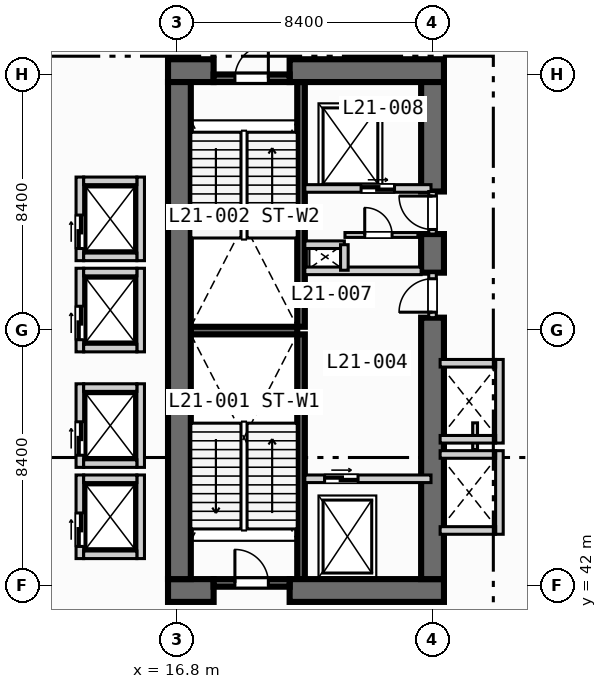
"""IFC4 building model, lengths in metres.
Left out: names, types, materials, properties, quantities, classifications, styles, units other than length and angle.
Written with IfcOpenShell. Run it as: python <this file> out.ifc"""

import sys

from ifc_helpers import new_model, si_unit, direction, frame, frame_2d, origin, place, context, subcontext, project, spatial, rectangle, extrude, element, fill, save


model = new_model("IFC4")
c1 = context("Model", 3, precision=1e-05, world=origin(), true_north=direction((0.0, 1.0)))
c2 = subcontext(c1, "Body", "Model", "MODEL_VIEW")
j1 = project(units=[si_unit("LENGTHUNIT", "METRE"), si_unit("PLANEANGLEUNIT", "RADIAN")], contexts=[c1])
p1 = place(None, origin())
s1 = spatial("IfcSite", under=j1, at=p1, CompositionType="ELEMENT")
p2 = place(p1, origin())
s2 = spatial("IfcBuilding", under=s1, at=p2, CompositionType="ELEMENT")
p3 = place(p2, frame((0.0, 0.0, 89.6)))
s3 = spatial("IfcBuildingStorey", under=s2, at=p3, CompositionType="ELEMENT", Elevation=89.6)
for number, where, z_axis, x_axis in (
    (1, (20.875, 42.2, 0.0), (0.0, 0.0, 1.0), (0.0, 1.0, 0.0)),
    (2, (20.875, 50.5, 0.0), (0.0, 0.0, 1.0), (0.0, 1.0, 0.0)),
):
    element("IfcWall", number, at=place(p3, frame(where, z_axis=z_axis, x_axis=x_axis)), inside=s3, PredefinedType="SOLIDWALL", context=c2, shape_type="SweptSolid", body=[
        extrude(rectangle(XDim=8.05, YDim=0.25, at=frame_2d((4.025, 0.0))), origin(), (0.0, 0.0, 1.0), 4.05),
    ])
p4 = place(p3, frame((17.25, 50.375, 0.0), z_axis=(0.0, 0.0, 1.0), x_axis=(1.0, 0.0, 0.0)))
e3 = element("IfcWall", 3, at=p4, inside=s3, PredefinedType="SOLIDWALL", context=c2, shape_type="SweptSolid", body=[
    extrude(rectangle(XDim=3.5, YDim=0.25, at=frame_2d((1.75, 0.0))), origin(), (0.0, 0.0, 1.0), 4.05),
])
p5 = place(p3, frame((16.5, 41.825, 0.0), z_axis=(0.0, 0.0, 1.0), x_axis=(1.0, 0.0, 0.0)))
e4 = element("IfcWall", 4, at=p5, inside=s3, PredefinedType="SHEAR", context=c2, shape_type="SweptSolid", body=[
    extrude(rectangle(XDim=1.5, YDim=0.75, at=frame_2d((0.75, 0.0))), origin(), (0.0, 0.0, 1.0), 4.05),
])
p6 = place(p3, frame((20.5, 41.825, 0.0), z_axis=(0.0, 0.0, 1.0), x_axis=(1.0, 0.0, 0.0)))
e5 = element("IfcWall", 5, at=p6, inside=s3, PredefinedType="SHEAR", context=c2, shape_type="SweptSolid", body=[
    extrude(rectangle(XDim=5.075, YDim=0.75, at=frame_2d((2.538, 0.0))), origin(), (0.0, 0.0, 1.0), 4.05),
])
p7 = place(p3, frame((16.5, 58.925, 0.0), z_axis=(0.0, 0.0, 1.0), x_axis=(1.0, 0.0, 0.0)))
e6 = element("IfcWall", 6, at=p7, inside=s3, PredefinedType="SHEAR", context=c2, shape_type="SweptSolid", body=[
    extrude(rectangle(XDim=1.5, YDim=0.75, at=frame_2d((0.75, 0.0))), origin(), (0.0, 0.0, 1.0), 4.05),
])
p8 = place(p3, frame((20.5, 58.925, 0.0), z_axis=(0.0, 0.0, 1.0), x_axis=(1.0, 0.0, 0.0)))
e7 = element("IfcWall", 7, at=p8, inside=s3, PredefinedType="SHEAR", context=c2, shape_type="SweptSolid", body=[
    extrude(rectangle(XDim=5.075, YDim=0.75, at=frame_2d((2.538, 0.0))), origin(), (0.0, 0.0, 1.0), 4.05),
])
p9 = place(p3, frame((16.875, 42.2, 0.0), z_axis=(0.0, 0.0, 1.0), x_axis=(0.0, 1.0, 0.0)))
e8 = element("IfcWall", 8, at=p9, inside=s3, PredefinedType="SHEAR", context=c2, shape_type="SweptSolid", body=[
    extrude(rectangle(XDim=16.35, YDim=0.75, at=frame_2d((8.175, 0.0))), origin(), (0.0, 0.0, 1.0), 4.05),
])
p10 = place(p3, frame((25.2, 42.2, 0.0), z_axis=(0.0, 0.0, 1.0), x_axis=(0.0, 1.0, 0.0)))
e9 = element("IfcWall", 9, at=p10, inside=s3, PredefinedType="SHEAR", context=c2, shape_type="SweptSolid", body=[
    extrude(rectangle(XDim=8.6, YDim=0.75, at=frame_2d((4.3, 0.0))), origin(), (0.0, 0.0, 1.0), 4.05),
])
p11 = place(p3, frame((25.2, 52.28, 0.0), z_axis=(0.0, 0.0, 1.0), x_axis=(0.0, 1.0, 0.0)))
e10 = element("IfcWall", 10, at=p11, inside=s3, PredefinedType="SHEAR", context=c2, shape_type="SweptSolid", body=[
    extrude(rectangle(XDim=1.27, YDim=0.75, at=frame_2d((0.635, 0.0))), origin(), (0.0, 0.0, 1.0), 4.05),
])
p12 = place(p3, frame((25.2, 54.95, 0.0), z_axis=(0.0, 0.0, 1.0), x_axis=(0.0, 1.0, 0.0)))
e11 = element("IfcWall", 11, at=p12, inside=s3, PredefinedType="SHEAR", context=c2, shape_type="SweptSolid", body=[
    extrude(rectangle(XDim=3.6, YDim=0.75, at=frame_2d((1.8, 0.0))), origin(), (0.0, 0.0, 1.0), 4.05),
])
p13 = place(p3, frame((18.0, 42.075, 0.0), z_axis=(0.0, 0.0, 1.0), x_axis=(1.0, 0.0, 0.0)))
e12 = element("IfcWall", 12, at=p13, inside=s3, PredefinedType="SOLIDWALL", context=c2, shape_type="SweptSolid", body=[
    extrude(rectangle(XDim=2.5, YDim=0.25, at=frame_2d((1.25, 0.0))), origin(), (0.0, 0.0, 1.0), 4.05),
])
p14 = place(p13, frame((0.7, 0.0, 0.0)))
e13 = element("IfcOpeningElement", 13, at=p14, cuts=e12, PredefinedType="OPENING", context=c2, shape_type="SweptSolid", body=[
    extrude(rectangle(XDim=1.1, YDim=2.15, at=frame_2d((0.55, 1.075))), frame((0.0, 0.135, 0.0), z_axis=(0.0, -1.0, 0.0), x_axis=(1.0, 0.0, 0.0)), (0.0, 0.0, 1.0), 0.27),
])
p15 = place(p3, frame((18.0, 58.675, 0.0), z_axis=(0.0, 0.0, 1.0), x_axis=(1.0, 0.0, 0.0)))
e14 = element("IfcWall", 14, at=p15, inside=s3, PredefinedType="SOLIDWALL", context=c2, shape_type="SweptSolid", body=[
    extrude(rectangle(XDim=2.5, YDim=0.25, at=frame_2d((1.25, 0.0))), origin(), (0.0, 0.0, 1.0), 4.05),
])
p16 = place(p15, frame((0.7, 0.0, 0.0)))
e15 = element("IfcOpeningElement", 15, at=p16, cuts=e14, PredefinedType="OPENING", context=c2, shape_type="SweptSolid", body=[
    extrude(rectangle(XDim=1.1, YDim=2.15, at=frame_2d((0.55, 1.075))), frame((0.0, 0.135, 0.0), z_axis=(0.0, -1.0, 0.0), x_axis=(1.0, 0.0, 0.0)), (0.0, 0.0, 1.0), 0.27),
])
p17 = place(p3, frame((21.0, 45.5, 0.0), z_axis=(0.0, 0.0, 1.0), x_axis=(1.0, 0.0, 0.0)))
e16 = element("IfcWall", 16, at=p17, inside=s3, PredefinedType="SOLIDWALL", context=c2, shape_type="SweptSolid", body=[
    extrude(rectangle(XDim=4.15, YDim=0.25, at=frame_2d((2.075, 0.0))), origin(), (0.0, 0.0, 1.0), 4.05),
])
p18 = place(p17, frame((0.65, 0.0, 0.0)))
e17 = element("IfcOpeningElement", 17, at=p18, cuts=e16, PredefinedType="OPENING", context=c2, shape_type="SweptSolid", body=[
    extrude(rectangle(XDim=1.1, YDim=2.15, at=frame_2d((0.55, 1.075))), frame((0.0, 0.135, 0.0), z_axis=(0.0, -1.0, 0.0), x_axis=(1.0, 0.0, 0.0)), (0.0, 0.0, 1.0), 0.27),
])
p19 = place(p3, frame((25.2, 50.8, 0.0), z_axis=(0.0, 0.0, 1.0), x_axis=(0.0, 1.0, 0.0)))
e18 = element("IfcWall", 18, at=p19, inside=s3, PredefinedType="SOLIDWALL", context=c2, shape_type="SweptSolid", body=[
    extrude(rectangle(XDim=1.48, YDim=0.25, at=frame_2d((0.74, 0.0))), origin(), (0.0, 0.0, 1.0), 4.05),
])
p20 = place(p19, frame((0.18, 0.0, 0.0)))
e19 = element("IfcOpeningElement", 19, at=p20, cuts=e18, PredefinedType="OPENING", context=c2, shape_type="SweptSolid", body=[
    extrude(rectangle(XDim=1.1, YDim=2.15, at=frame_2d((0.55, 1.075))), frame((0.0, 0.135, 0.0), z_axis=(0.0, -1.0, 0.0), x_axis=(1.0, 0.0, 0.0)), (0.0, 0.0, 1.0), 0.27),
])
p21 = place(p3, frame((21.0, 52.34, 0.0), z_axis=(0.0, 0.0, 1.0), x_axis=(1.0, 0.0, 0.0)))
e20 = element("IfcWall", 20, at=p21, inside=s3, PredefinedType="SOLIDWALL", context=c2, shape_type="SweptSolid", body=[
    extrude(rectangle(XDim=3.825, YDim=0.25, at=frame_2d((1.913, 0.0))), origin(), (0.0, 0.0, 1.0), 4.05),
])
p22 = place(p3, frame((21.0, 55.05, 0.0), z_axis=(0.0, 0.0, 1.0), x_axis=(1.0, 0.0, 0.0)))
e21 = element("IfcWall", 21, at=p22, inside=s3, PredefinedType="SOLIDWALL", context=c2, shape_type="SweptSolid", body=[
    extrude(rectangle(XDim=4.15, YDim=0.25, at=frame_2d((2.075, 0.0))), origin(), (0.0, 0.0, 1.0), 4.05),
])
p23 = place(p22, frame((1.85, 0.0, 0.0)))
e22 = element("IfcOpeningElement", 22, at=p23, cuts=e21, PredefinedType="OPENING", context=c2, shape_type="SweptSolid", body=[
    extrude(rectangle(XDim=1.1, YDim=2.15, at=frame_2d((0.55, 1.075))), frame((0.0, 0.135, 0.0), z_axis=(0.0, -1.0, 0.0), x_axis=(1.0, 0.0, 0.0)), (0.0, 0.0, 1.0), 0.27),
])
p24 = place(p3, frame((25.2, 53.55, 0.0), z_axis=(0.0, 0.0, 1.0), x_axis=(0.0, 1.0, 0.0)))
e23 = element("IfcWall", 23, at=p24, inside=s3, PredefinedType="SOLIDWALL", context=c2, shape_type="SweptSolid", body=[
    extrude(rectangle(XDim=1.4, YDim=0.25, at=frame_2d((0.7, 0.0))), origin(), (0.0, 0.0, 1.0), 4.05),
])
p25 = place(p24, frame((0.15, 0.0, 0.0)))
e24 = element("IfcOpeningElement", 24, at=p25, cuts=e23, PredefinedType="OPENING", context=c2, shape_type="SweptSolid", body=[
    extrude(rectangle(XDim=1.1, YDim=2.15, at=frame_2d((0.55, 1.075))), frame((0.0, 0.135, 0.0), z_axis=(0.0, -1.0, 0.0), x_axis=(1.0, 0.0, 0.0)), (0.0, 0.0, 1.0), 0.27),
])
p26 = place(p3, frame((21.0, 53.2, 0.0), z_axis=(0.0, 0.0, 1.0), x_axis=(1.0, 0.0, 0.0)))
e25 = element("IfcWall", 25, at=p26, inside=s3, PredefinedType="SOLIDWALL", context=c2, shape_type="SweptSolid", body=[
    extrude(rectangle(XDim=1.3, YDim=0.25, at=frame_2d((0.65, 0.0))), origin(), (0.0, 0.0, 1.0), 4.05),
])
p27 = place(p3, frame((22.3, 52.36, 0.0), z_axis=(0.0, 0.0, 1.0), x_axis=(0.0, 1.0, 0.0)))
e26 = element("IfcWall", 26, at=p27, inside=s3, PredefinedType="SOLIDWALL", context=c2, shape_type="SweptSolid", body=[
    extrude(rectangle(XDim=0.84, YDim=0.25, at=frame_2d((0.42, 0.0))), origin(), (0.0, 0.0, 1.0), 4.05),
])
p28 = place(p3, frame((22.32, 53.52, 0.0), z_axis=(0.0, 0.0, 1.0), x_axis=(1.0, 0.0, 0.0)))
e27 = element("IfcWall", 27, at=p28, inside=s3, PredefinedType="PARTITIONING", context=c2, shape_type="SweptSolid", body=[
    extrude(rectangle(XDim=2.4, YDim=0.16, at=frame_2d((1.2, 0.0))), origin(), (0.0, 0.0, 1.0), 4.05),
])
p29 = place(p28, frame((0.65, 0.0, 0.0)))
e28 = element("IfcOpeningElement", 28, at=p29, cuts=e27, PredefinedType="OPENING", context=c2, shape_type="SweptSolid", body=[
    extrude(rectangle(XDim=0.9, YDim=2.1, at=frame_2d((0.45, 1.05))), frame((0.0, 0.09, 0.0), z_axis=(0.0, -1.0, 0.0), x_axis=(1.0, 0.0, 0.0)), (0.0, 0.0, 1.0), 0.18),
])
p30 = place(p3, frame((13.6, 42.875, 0.0), z_axis=(0.0, 0.0, 1.0), x_axis=(0.0, 1.0, 0.0)))
e29 = element("IfcWall", 29, at=p30, inside=s3, PredefinedType="SOLIDWALL", context=c2, shape_type="SweptSolid", body=[
    extrude(rectangle(XDim=2.75, YDim=0.25, at=frame_2d((1.375, 0.0))), origin(), (0.0, 0.0, 1.0), 4.05),
])
p31 = place(p30, frame((0.4, 0.0, 0.0)))
e30 = element("IfcOpeningElement", 30, at=p31, cuts=e29, PredefinedType="OPENING", context=c2, shape_type="SweptSolid", body=[
    extrude(rectangle(XDim=1.1, YDim=2.15, at=frame_2d((0.55, 1.075))), frame((0.0, 0.135, 0.0), z_axis=(0.0, -1.0, 0.0), x_axis=(1.0, 0.0, 0.0)), (0.0, 0.0, 1.0), 0.27),
])
p32 = place(p3, frame((15.6, 42.875, 0.0), z_axis=(0.0, 0.0, 1.0), x_axis=(0.0, 1.0, 0.0)))
e31 = element("IfcWall", 31, at=p32, inside=s3, PredefinedType="SOLIDWALL", context=c2, shape_type="SweptSolid", body=[
    extrude(rectangle(XDim=2.75, YDim=0.25, at=frame_2d((1.375, 0.0))), origin(), (0.0, 0.0, 1.0), 4.05),
])
for number, where, z_axis, x_axis in (
    (32, (13.725, 43.0, 0.0), (0.0, 0.0, 1.0), (1.0, 0.0, 0.0)),
    (33, (13.725, 45.5, 0.0), (0.0, 0.0, 1.0), (1.0, 0.0, 0.0)),
):
    element("IfcWall", number, at=place(p3, frame(where, z_axis=z_axis, x_axis=x_axis)), inside=s3, PredefinedType="SOLIDWALL", context=c2, shape_type="SweptSolid", body=[
        extrude(rectangle(XDim=1.75, YDim=0.25, at=frame_2d((0.875, 0.0))), origin(), (0.0, 0.0, 1.0), 4.05),
    ])
p33 = place(p3, frame((13.6, 45.875, 0.0), z_axis=(0.0, 0.0, 1.0), x_axis=(0.0, 1.0, 0.0)))
e34 = element("IfcWall", 34, at=p33, inside=s3, PredefinedType="SOLIDWALL", context=c2, shape_type="SweptSolid", body=[
    extrude(rectangle(XDim=2.75, YDim=0.25, at=frame_2d((1.375, 0.0))), origin(), (0.0, 0.0, 1.0), 4.05),
])
p34 = place(p33, frame((0.4, 0.0, 0.0)))
e35 = element("IfcOpeningElement", 35, at=p34, cuts=e34, PredefinedType="OPENING", context=c2, shape_type="SweptSolid", body=[
    extrude(rectangle(XDim=1.1, YDim=2.15, at=frame_2d((0.55, 1.075))), frame((0.0, 0.135, 0.0), z_axis=(0.0, -1.0, 0.0), x_axis=(1.0, 0.0, 0.0)), (0.0, 0.0, 1.0), 0.27),
])
p35 = place(p3, frame((15.6, 45.875, 0.0), z_axis=(0.0, 0.0, 1.0), x_axis=(0.0, 1.0, 0.0)))
e36 = element("IfcWall", 36, at=p35, inside=s3, PredefinedType="SOLIDWALL", context=c2, shape_type="SweptSolid", body=[
    extrude(rectangle(XDim=2.75, YDim=0.25, at=frame_2d((1.375, 0.0))), origin(), (0.0, 0.0, 1.0), 4.05),
])
for number, where, z_axis, x_axis in (
    (37, (13.725, 46.0, 0.0), (0.0, 0.0, 1.0), (1.0, 0.0, 0.0)),
    (38, (13.725, 48.5, 0.0), (0.0, 0.0, 1.0), (1.0, 0.0, 0.0)),
):
    element("IfcWall", number, at=place(p3, frame(where, z_axis=z_axis, x_axis=x_axis)), inside=s3, PredefinedType="SOLIDWALL", context=c2, shape_type="SweptSolid", body=[
        extrude(rectangle(XDim=1.75, YDim=0.25, at=frame_2d((0.875, 0.0))), origin(), (0.0, 0.0, 1.0), 4.05),
    ])
p36 = place(p3, frame((13.6, 49.675, 0.0), z_axis=(0.0, 0.0, 1.0), x_axis=(0.0, 1.0, 0.0)))
e39 = element("IfcWall", 39, at=p36, inside=s3, PredefinedType="SOLIDWALL", context=c2, shape_type="SweptSolid", body=[
    extrude(rectangle(XDim=2.75, YDim=0.25, at=frame_2d((1.375, 0.0))), origin(), (0.0, 0.0, 1.0), 4.05),
])
p37 = place(p36, frame((0.4, 0.0, 0.0)))
e40 = element("IfcOpeningElement", 40, at=p37, cuts=e39, PredefinedType="OPENING", context=c2, shape_type="SweptSolid", body=[
    extrude(rectangle(XDim=1.1, YDim=2.15, at=frame_2d((0.55, 1.075))), frame((0.0, 0.135, 0.0), z_axis=(0.0, -1.0, 0.0), x_axis=(1.0, 0.0, 0.0)), (0.0, 0.0, 1.0), 0.27),
])
p38 = place(p3, frame((15.6, 49.675, 0.0), z_axis=(0.0, 0.0, 1.0), x_axis=(0.0, 1.0, 0.0)))
e41 = element("IfcWall", 41, at=p38, inside=s3, PredefinedType="SOLIDWALL", context=c2, shape_type="SweptSolid", body=[
    extrude(rectangle(XDim=2.75, YDim=0.25, at=frame_2d((1.375, 0.0))), origin(), (0.0, 0.0, 1.0), 4.05),
])
for number, where, z_axis, x_axis in (
    (42, (13.725, 49.8, 0.0), (0.0, 0.0, 1.0), (1.0, 0.0, 0.0)),
    (43, (13.725, 52.3, 0.0), (0.0, 0.0, 1.0), (1.0, 0.0, 0.0)),
):
    element("IfcWall", number, at=place(p3, frame(where, z_axis=z_axis, x_axis=x_axis)), inside=s3, PredefinedType="SOLIDWALL", context=c2, shape_type="SweptSolid", body=[
        extrude(rectangle(XDim=1.75, YDim=0.25, at=frame_2d((0.875, 0.0))), origin(), (0.0, 0.0, 1.0), 4.05),
    ])
p39 = place(p3, frame((13.6, 52.675, 0.0), z_axis=(0.0, 0.0, 1.0), x_axis=(0.0, 1.0, 0.0)))
e44 = element("IfcWall", 44, at=p39, inside=s3, PredefinedType="SOLIDWALL", context=c2, shape_type="SweptSolid", body=[
    extrude(rectangle(XDim=2.75, YDim=0.25, at=frame_2d((1.375, 0.0))), origin(), (0.0, 0.0, 1.0), 4.05),
])
p40 = place(p39, frame((0.4, 0.0, 0.0)))
e45 = element("IfcOpeningElement", 45, at=p40, cuts=e44, PredefinedType="OPENING", context=c2, shape_type="SweptSolid", body=[
    extrude(rectangle(XDim=1.1, YDim=2.15, at=frame_2d((0.55, 1.075))), frame((0.0, 0.135, 0.0), z_axis=(0.0, -1.0, 0.0), x_axis=(1.0, 0.0, 0.0)), (0.0, 0.0, 1.0), 0.27),
])
p41 = place(p3, frame((15.6, 52.675, 0.0), z_axis=(0.0, 0.0, 1.0), x_axis=(0.0, 1.0, 0.0)))
e46 = element("IfcWall", 46, at=p41, inside=s3, PredefinedType="SOLIDWALL", context=c2, shape_type="SweptSolid", body=[
    extrude(rectangle(XDim=2.75, YDim=0.25, at=frame_2d((1.375, 0.0))), origin(), (0.0, 0.0, 1.0), 4.05),
])
for number, where, z_axis, x_axis in (
    (47, (13.725, 52.8, 0.0), (0.0, 0.0, 1.0), (1.0, 0.0, 0.0)),
    (48, (13.725, 55.3, 0.0), (0.0, 0.0, 1.0), (1.0, 0.0, 0.0)),
):
    element("IfcWall", number, at=place(p3, frame(where, z_axis=z_axis, x_axis=x_axis)), inside=s3, PredefinedType="SOLIDWALL", context=c2, shape_type="SweptSolid", body=[
        extrude(rectangle(XDim=1.75, YDim=0.25, at=frame_2d((0.875, 0.0))), origin(), (0.0, 0.0, 1.0), 4.05),
    ])
p42 = place(p3, frame((27.4, 43.675, 0.0), z_axis=(0.0, 0.0, 1.0), x_axis=(0.0, 1.0, 0.0)))
e49 = element("IfcWall", 49, at=p42, inside=s3, PredefinedType="SOLIDWALL", context=c2, shape_type="SweptSolid", body=[
    extrude(rectangle(XDim=2.75, YDim=0.25, at=frame_2d((1.375, 0.0))), origin(), (0.0, 0.0, 1.0), 4.05),
])
for number, where, z_axis, x_axis in (
    (50, (25.45, 43.8, 0.0), (0.0, 0.0, 1.0), (1.0, 0.0, 0.0)),
    (51, (25.45, 46.3, 0.0), (0.0, 0.0, 1.0), (1.0, 0.0, 0.0)),
):
    element("IfcWall", number, at=place(p3, frame(where, z_axis=z_axis, x_axis=x_axis)), inside=s3, PredefinedType="SOLIDWALL", context=c2, shape_type="SweptSolid", body=[
        extrude(rectangle(XDim=1.825, YDim=0.25, at=frame_2d((0.913, 0.0))), origin(), (0.0, 0.0, 1.0), 4.05),
    ])
p43 = place(p3, frame((26.6, 46.46, 0.0), z_axis=(0.0, 0.0, 1.0), x_axis=(0.0, 1.0, 0.0)))
e52 = element("IfcWall", 52, at=p43, inside=s3, PredefinedType="PARTITIONING", context=c2, shape_type="SweptSolid", body=[
    extrude(rectangle(XDim=0.88, YDim=0.16, at=frame_2d((0.44, 0.0))), origin(), (0.0, 0.0, 1.0), 4.05),
])
p44 = place(p3, frame((27.4, 46.675, 0.0), z_axis=(0.0, 0.0, 1.0), x_axis=(0.0, 1.0, 0.0)))
e53 = element("IfcWall", 53, at=p44, inside=s3, PredefinedType="SOLIDWALL", context=c2, shape_type="SweptSolid", body=[
    extrude(rectangle(XDim=2.75, YDim=0.25, at=frame_2d((1.375, 0.0))), origin(), (0.0, 0.0, 1.0), 4.05),
])
for number, where, z_axis, x_axis in (
    (54, (25.45, 46.8, 0.0), (0.0, 0.0, 1.0), (1.0, 0.0, 0.0)),
    (55, (25.45, 49.3, 0.0), (0.0, 0.0, 1.0), (1.0, 0.0, 0.0)),
):
    element("IfcWall", number, at=place(p3, frame(where, z_axis=z_axis, x_axis=x_axis)), inside=s3, PredefinedType="SOLIDWALL", context=c2, shape_type="SweptSolid", body=[
        extrude(rectangle(XDim=1.825, YDim=0.25, at=frame_2d((0.913, 0.0))), origin(), (0.0, 0.0, 1.0), 4.05),
    ])
p45 = place(p14, origin())
e56 = element("IfcDoor", 56, at=p45, inside=s3, OperationType="SINGLE_SWING_LEFT", PredefinedType="DOOR", context=c2, shape_type="SweptSolid", body=[
    extrude(rectangle(XDim=1.1, YDim=2.15, at=frame_2d((0.55, 1.075))), frame((0.0, 0.025, 0.0), z_axis=(0.0, -1.0, 0.0), x_axis=(1.0, 0.0, 0.0)), (0.0, 0.0, 1.0), 0.05),
])
fill(e13, e56)
p46 = place(p16, origin())
e57 = element("IfcDoor", 57, at=p46, inside=s3, OperationType="SINGLE_SWING_RIGHT", PredefinedType="DOOR", context=c2, shape_type="SweptSolid", body=[
    extrude(rectangle(XDim=1.1, YDim=2.15, at=frame_2d((0.55, 1.075))), frame((0.0, 0.025, 0.0), z_axis=(0.0, -1.0, 0.0), x_axis=(1.0, 0.0, 0.0)), (0.0, 0.0, 1.0), 0.05),
])
fill(e15, e57)
p47 = place(p18, origin())
e58 = element("IfcDoor", 58, at=p47, inside=s3, OperationType="SLIDING_TO_LEFT", PredefinedType="DOOR", context=c2, shape_type="SweptSolid", body=[
    extrude(rectangle(XDim=1.1, YDim=2.15, at=frame_2d((0.55, 1.075))), frame((0.0, 0.025, 0.0), z_axis=(0.0, -1.0, 0.0), x_axis=(1.0, 0.0, 0.0)), (0.0, 0.0, 1.0), 0.05),
])
fill(e17, e58)
p48 = place(p20, origin())
e59 = element("IfcDoor", 59, at=p48, inside=s3, OperationType="SINGLE_SWING_LEFT", PredefinedType="DOOR", context=c2, shape_type="SweptSolid", body=[
    extrude(rectangle(XDim=1.1, YDim=2.15, at=frame_2d((0.55, 1.075))), frame((0.0, 0.025, 0.0), z_axis=(0.0, -1.0, 0.0), x_axis=(1.0, 0.0, 0.0)), (0.0, 0.0, 1.0), 0.05),
])
fill(e19, e59)
p49 = place(p23, origin())
e60 = element("IfcDoor", 60, at=p49, inside=s3, OperationType="SLIDING_TO_LEFT", PredefinedType="DOOR", context=c2, shape_type="SweptSolid", body=[
    extrude(rectangle(XDim=1.1, YDim=2.15, at=frame_2d((0.55, 1.075))), frame((0.0, 0.025, 0.0), z_axis=(0.0, -1.0, 0.0), x_axis=(1.0, 0.0, 0.0)), (0.0, 0.0, 1.0), 0.05),
])
fill(e22, e60)
p50 = place(p25, origin())
e61 = element("IfcDoor", 61, at=p50, inside=s3, OperationType="SINGLE_SWING_RIGHT", PredefinedType="DOOR", context=c2, shape_type="SweptSolid", body=[
    extrude(rectangle(XDim=1.1, YDim=2.15, at=frame_2d((0.55, 1.075))), frame((0.0, 0.025, 0.0), z_axis=(0.0, -1.0, 0.0), x_axis=(1.0, 0.0, 0.0)), (0.0, 0.0, 1.0), 0.05),
])
fill(e24, e61)
p51 = place(p29, origin())
e62 = element("IfcDoor", 62, at=p51, inside=s3, OperationType="SINGLE_SWING_LEFT", PredefinedType="DOOR", context=c2, shape_type="SweptSolid", body=[
    extrude(rectangle(XDim=0.9, YDim=2.1, at=frame_2d((0.45, 1.05))), frame((0.0, 0.025, 0.0), z_axis=(0.0, -1.0, 0.0), x_axis=(1.0, 0.0, 0.0)), (0.0, 0.0, 1.0), 0.05),
])
fill(e28, e62)
p52 = place(p31, origin())
e63 = element("IfcDoor", 63, at=p52, inside=s3, OperationType="SLIDING_TO_LEFT", PredefinedType="DOOR", context=c2, shape_type="SweptSolid", body=[
    extrude(rectangle(XDim=1.1, YDim=2.15, at=frame_2d((0.55, 1.075))), frame((0.0, 0.025, 0.0), z_axis=(0.0, -1.0, 0.0), x_axis=(1.0, 0.0, 0.0)), (0.0, 0.0, 1.0), 0.05),
])
fill(e30, e63)
p53 = place(p34, origin())
e64 = element("IfcDoor", 64, at=p53, inside=s3, OperationType="SLIDING_TO_LEFT", PredefinedType="DOOR", context=c2, shape_type="SweptSolid", body=[
    extrude(rectangle(XDim=1.1, YDim=2.15, at=frame_2d((0.55, 1.075))), frame((0.0, 0.025, 0.0), z_axis=(0.0, -1.0, 0.0), x_axis=(1.0, 0.0, 0.0)), (0.0, 0.0, 1.0), 0.05),
])
fill(e35, e64)
p54 = place(p37, origin())
e65 = element("IfcDoor", 65, at=p54, inside=s3, OperationType="SLIDING_TO_LEFT", PredefinedType="DOOR", context=c2, shape_type="SweptSolid", body=[
    extrude(rectangle(XDim=1.1, YDim=2.15, at=frame_2d((0.55, 1.075))), frame((0.0, 0.025, 0.0), z_axis=(0.0, -1.0, 0.0), x_axis=(1.0, 0.0, 0.0)), (0.0, 0.0, 1.0), 0.05),
])
fill(e40, e65)
p55 = place(p40, origin())
e66 = element("IfcDoor", 66, at=p55, inside=s3, OperationType="SLIDING_TO_LEFT", PredefinedType="DOOR", context=c2, shape_type="SweptSolid", body=[
    extrude(rectangle(XDim=1.1, YDim=2.15, at=frame_2d((0.55, 1.075))), frame((0.0, 0.025, 0.0), z_axis=(0.0, -1.0, 0.0), x_axis=(1.0, 0.0, 0.0)), (0.0, 0.0, 1.0), 0.05),
])
fill(e45, e66)
save(model, sys.argv[1])
